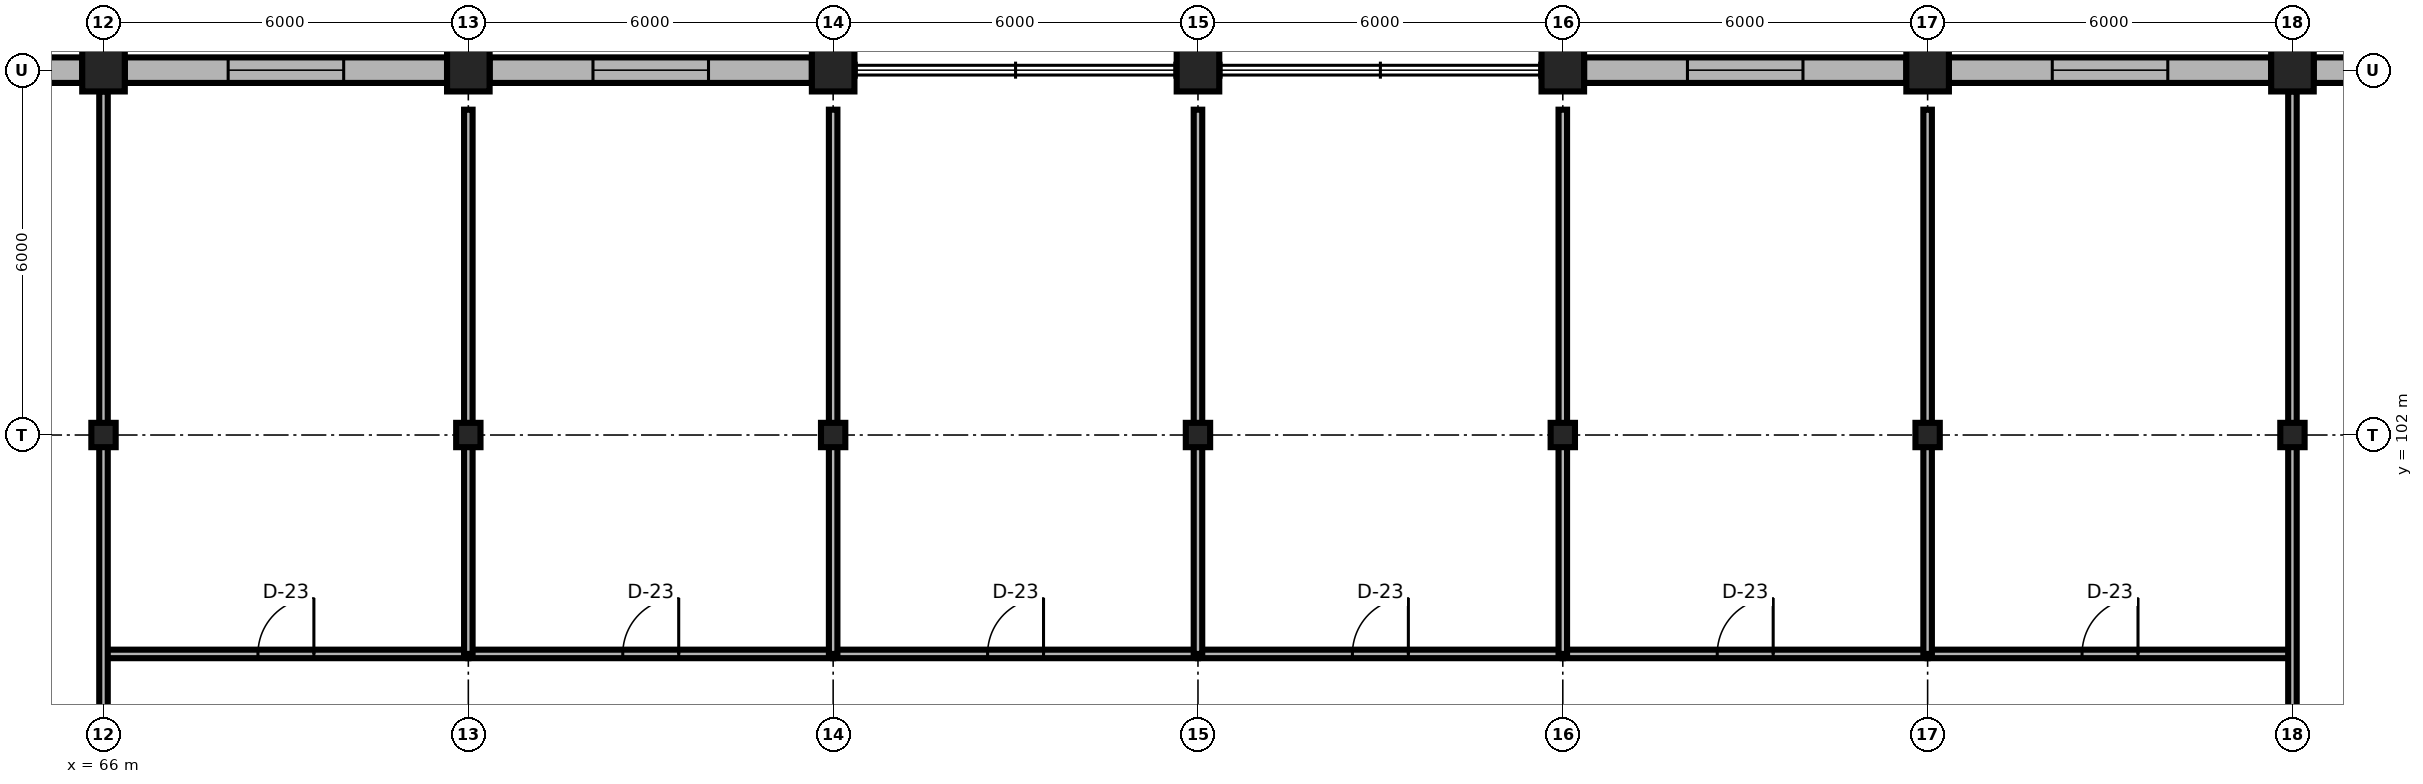
"""IFC4 building model, lengths in metres.
Left out: names, types, materials, properties, quantities, classifications, styles, units other than length and angle.
Written with IfcOpenShell. Run it as: python <this file> out.ifc"""

import sys

from ifc_helpers import new_model, si_unit, direction, frame, frame_2d, origin, origin_2d, place, context, subcontext, project, spatial, rectangle, i_section, extrude, element, fill, save


model = new_model("IFC4")
c1 = context("Model", 3, precision=1e-05, world=origin(), true_north=direction((0.0, 1.0)))
c2 = subcontext(c1, "Body", "Model", "MODEL_VIEW")
j1 = project(units=[si_unit("LENGTHUNIT", "METRE"), si_unit("PLANEANGLEUNIT", "RADIAN")], contexts=[c1])
p1 = place(None, origin())
s1 = spatial("IfcSite", under=j1, at=p1, CompositionType="ELEMENT")
p2 = place(p1, origin())
s2 = spatial("IfcBuilding", under=s1, at=p2, CompositionType="ELEMENT")
p3 = place(p2, frame((0.0, 0.0, 24.9)))
s3 = spatial("IfcBuildingStorey", under=s2, at=p3, CompositionType="ELEMENT", Elevation=24.9)
for number, where, z_axis, x_axis in (
    (1, (66.0, 102.0, 0.0), (0.0, 0.0, 1.0), (1.0, 0.0, 0.0)),
    (2, (72.0, 102.0, 0.0), (0.0, 0.0, 1.0), (1.0, 0.0, 0.0)),
    (3, (78.0, 102.0, 0.0), (0.0, 0.0, 1.0), (1.0, 0.0, 0.0)),
    (4, (84.0, 102.0, 0.0), (0.0, 0.0, 1.0), (1.0, 0.0, 0.0)),
    (5, (90.0, 102.0, 0.0), (0.0, 0.0, 1.0), (1.0, 0.0, 0.0)),
    (6, (96.0, 102.0, 0.0), (0.0, 0.0, 1.0), (1.0, 0.0, 0.0)),
    (7, (102.0, 102.0, 0.0), (0.0, 0.0, 1.0), (1.0, 0.0, 0.0)),
):
    element("IfcColumn", number, at=place(p3, frame(where, z_axis=z_axis, x_axis=x_axis)), inside=s3, PredefinedType="COLUMN", context=c2, shape_type="SweptSolid", body=[
        extrude(i_section(OverallWidth=0.4, OverallDepth=0.4, WebThickness=0.013, FlangeThickness=0.021, FilletRadius=0.022, at=origin_2d()), origin(), (0.0, 0.0, 1.0), 3.9),
    ])
for number, where, z_axis, x_axis in (
    (8, (66.0, 108.0, 0.0), (0.0, 0.0, 1.0), (1.0, 0.0, 0.0)),
    (9, (72.0, 108.0, 0.0), (0.0, 0.0, 1.0), (1.0, 0.0, 0.0)),
    (10, (78.0, 108.0, 0.0), (0.0, 0.0, 1.0), (1.0, 0.0, 0.0)),
    (11, (84.0, 108.0, 0.0), (0.0, 0.0, 1.0), (1.0, 0.0, 0.0)),
    (12, (90.0, 108.0, 0.0), (0.0, 0.0, 1.0), (1.0, 0.0, 0.0)),
    (13, (96.0, 108.0, 0.0), (0.0, 0.0, 1.0), (1.0, 0.0, 0.0)),
    (14, (102.0, 108.0, 0.0), (0.0, 0.0, 1.0), (1.0, 0.0, 0.0)),
):
    element("IfcColumn", number, at=place(p3, frame(where, z_axis=z_axis, x_axis=x_axis)), inside=s3, PredefinedType="COLUMN", context=c2, shape_type="SweptSolid", body=[
        extrude(rectangle(XDim=0.7, YDim=0.7, at=origin_2d()), origin(), (0.0, 0.0, 1.0), 3.9),
    ])
p4 = place(p3, frame((60.35, 108.0, 0.0), z_axis=(0.0, 0.0, 1.0), x_axis=(1.0, 0.0, 0.0)))
e15 = element("IfcWall", 15, at=p4, inside=s3, PredefinedType="SOLIDWALL", context=c2, shape_type="SweptSolid", body=[
    extrude(rectangle(XDim=5.3, YDim=0.42, at=frame_2d((2.65, 0.0))), origin(), (0.0, 0.0, 1.0), 3.32),
])
p5 = place(p4, frame((1.7, 0.0, 0.85)))
e16 = element("IfcOpeningElement", 16, at=p5, cuts=e15, PredefinedType="OPENING", context=c2, shape_type="SweptSolid", body=[
    extrude(rectangle(XDim=1.9, YDim=2.1, at=frame_2d((0.95, 1.05))), frame((0.0, 0.225, 0.0), z_axis=(0.0, -1.0, 0.0), x_axis=(1.0, 0.0, 0.0)), (0.0, 0.0, 1.0), 0.45),
])
p6 = place(p3, frame((66.35, 108.0, 0.0), z_axis=(0.0, 0.0, 1.0), x_axis=(1.0, 0.0, 0.0)))
e17 = element("IfcWall", 17, at=p6, inside=s3, PredefinedType="SOLIDWALL", context=c2, shape_type="SweptSolid", body=[
    extrude(rectangle(XDim=5.3, YDim=0.42, at=frame_2d((2.65, 0.0))), origin(), (0.0, 0.0, 1.0), 3.32),
])
p7 = place(p6, frame((1.7, 0.0, 0.85)))
e18 = element("IfcOpeningElement", 18, at=p7, cuts=e17, PredefinedType="OPENING", context=c2, shape_type="SweptSolid", body=[
    extrude(rectangle(XDim=1.9, YDim=2.1, at=frame_2d((0.95, 1.05))), frame((0.0, 0.225, 0.0), z_axis=(0.0, -1.0, 0.0), x_axis=(1.0, 0.0, 0.0)), (0.0, 0.0, 1.0), 0.45),
])
p8 = place(p3, frame((72.35, 108.0, 0.0), z_axis=(0.0, 0.0, 1.0), x_axis=(1.0, 0.0, 0.0)))
e19 = element("IfcWall", 19, at=p8, inside=s3, PredefinedType="SOLIDWALL", context=c2, shape_type="SweptSolid", body=[
    extrude(rectangle(XDim=5.3, YDim=0.42, at=frame_2d((2.65, 0.0))), origin(), (0.0, 0.0, 1.0), 3.32),
])
p9 = place(p8, frame((1.7, 0.0, 0.85)))
e20 = element("IfcOpeningElement", 20, at=p9, cuts=e19, PredefinedType="OPENING", context=c2, shape_type="SweptSolid", body=[
    extrude(rectangle(XDim=1.9, YDim=2.1, at=frame_2d((0.95, 1.05))), frame((0.0, 0.225, 0.0), z_axis=(0.0, -1.0, 0.0), x_axis=(1.0, 0.0, 0.0)), (0.0, 0.0, 1.0), 0.45),
])
p10 = place(p3, frame((90.35, 108.0, 0.0), z_axis=(0.0, 0.0, 1.0), x_axis=(1.0, 0.0, 0.0)))
e21 = element("IfcWall", 21, at=p10, inside=s3, PredefinedType="SOLIDWALL", context=c2, shape_type="SweptSolid", body=[
    extrude(rectangle(XDim=5.3, YDim=0.42, at=frame_2d((2.65, 0.0))), origin(), (0.0, 0.0, 1.0), 3.32),
])
p11 = place(p10, frame((1.7, 0.0, 0.85)))
e22 = element("IfcOpeningElement", 22, at=p11, cuts=e21, PredefinedType="OPENING", context=c2, shape_type="SweptSolid", body=[
    extrude(rectangle(XDim=1.9, YDim=2.1, at=frame_2d((0.95, 1.05))), frame((0.0, 0.225, 0.0), z_axis=(0.0, -1.0, 0.0), x_axis=(1.0, 0.0, 0.0)), (0.0, 0.0, 1.0), 0.45),
])
p12 = place(p3, frame((96.35, 108.0, 0.0), z_axis=(0.0, 0.0, 1.0), x_axis=(1.0, 0.0, 0.0)))
e23 = element("IfcWall", 23, at=p12, inside=s3, PredefinedType="SOLIDWALL", context=c2, shape_type="SweptSolid", body=[
    extrude(rectangle(XDim=5.3, YDim=0.42, at=frame_2d((2.65, 0.0))), origin(), (0.0, 0.0, 1.0), 3.32),
])
p13 = place(p12, frame((1.7, 0.0, 0.85)))
e24 = element("IfcOpeningElement", 24, at=p13, cuts=e23, PredefinedType="OPENING", context=c2, shape_type="SweptSolid", body=[
    extrude(rectangle(XDim=1.9, YDim=2.1, at=frame_2d((0.95, 1.05))), frame((0.0, 0.225, 0.0), z_axis=(0.0, -1.0, 0.0), x_axis=(1.0, 0.0, 0.0)), (0.0, 0.0, 1.0), 0.45),
])
p14 = place(p3, frame((102.35, 108.0, 0.0), z_axis=(0.0, 0.0, 1.0), x_axis=(1.0, 0.0, 0.0)))
e25 = element("IfcWall", 25, at=p14, inside=s3, PredefinedType="SOLIDWALL", context=c2, shape_type="SweptSolid", body=[
    extrude(rectangle(XDim=5.3, YDim=0.42, at=frame_2d((2.65, 0.0))), origin(), (0.0, 0.0, 1.0), 3.32),
])
p15 = place(p14, frame((1.7, 0.0, 0.85)))
e26 = element("IfcOpeningElement", 26, at=p15, cuts=e25, PredefinedType="OPENING", context=c2, shape_type="SweptSolid", body=[
    extrude(rectangle(XDim=1.9, YDim=2.1, at=frame_2d((0.95, 1.05))), frame((0.0, 0.225, 0.0), z_axis=(0.0, -1.0, 0.0), x_axis=(1.0, 0.0, 0.0)), (0.0, 0.0, 1.0), 0.45),
])
p16 = place(p3, frame((66.0, 98.4, 0.0), z_axis=(0.0, 0.0, 1.0), x_axis=(1.0, 0.0, 0.0)))
e27 = element("IfcWall", 27, at=p16, inside=s3, PredefinedType="PARTITIONING", context=c2, shape_type="SweptSolid", body=[
    extrude(rectangle(XDim=6.0, YDim=0.14, at=frame_2d((3.0, 0.0))), origin(), (0.0, 0.0, 1.0), 3.74),
])
p17 = place(p16, frame((2.54, 0.0, 0.0)))
e28 = element("IfcOpeningElement", 28, at=p17, cuts=e27, PredefinedType="OPENING", context=c2, shape_type="SweptSolid", body=[
    extrude(rectangle(XDim=0.92, YDim=2.15, at=frame_2d((0.46, 1.075))), frame((0.0, 0.085, 0.0), z_axis=(0.0, -1.0, 0.0), x_axis=(1.0, 0.0, 0.0)), (0.0, 0.0, 1.0), 0.17),
])
p18 = place(p3, frame((72.0, 98.4, 0.0), z_axis=(0.0, 0.0, 1.0), x_axis=(1.0, 0.0, 0.0)))
e29 = element("IfcWall", 29, at=p18, inside=s3, PredefinedType="PARTITIONING", context=c2, shape_type="SweptSolid", body=[
    extrude(rectangle(XDim=6.0, YDim=0.14, at=frame_2d((3.0, 0.0))), origin(), (0.0, 0.0, 1.0), 3.74),
])
p19 = place(p18, frame((2.54, 0.0, 0.0)))
e30 = element("IfcOpeningElement", 30, at=p19, cuts=e29, PredefinedType="OPENING", context=c2, shape_type="SweptSolid", body=[
    extrude(rectangle(XDim=0.92, YDim=2.15, at=frame_2d((0.46, 1.075))), frame((0.0, 0.085, 0.0), z_axis=(0.0, -1.0, 0.0), x_axis=(1.0, 0.0, 0.0)), (0.0, 0.0, 1.0), 0.17),
])
p20 = place(p3, frame((78.0, 98.4, 0.0), z_axis=(0.0, 0.0, 1.0), x_axis=(1.0, 0.0, 0.0)))
e31 = element("IfcWall", 31, at=p20, inside=s3, PredefinedType="PARTITIONING", context=c2, shape_type="SweptSolid", body=[
    extrude(rectangle(XDim=6.0, YDim=0.14, at=frame_2d((3.0, 0.0))), origin(), (0.0, 0.0, 1.0), 3.74),
])
p21 = place(p20, frame((2.54, 0.0, 0.0)))
e32 = element("IfcOpeningElement", 32, at=p21, cuts=e31, PredefinedType="OPENING", context=c2, shape_type="SweptSolid", body=[
    extrude(rectangle(XDim=0.92, YDim=2.15, at=frame_2d((0.46, 1.075))), frame((0.0, 0.085, 0.0), z_axis=(0.0, -1.0, 0.0), x_axis=(1.0, 0.0, 0.0)), (0.0, 0.0, 1.0), 0.17),
])
p22 = place(p3, frame((84.0, 98.4, 0.0), z_axis=(0.0, 0.0, 1.0), x_axis=(1.0, 0.0, 0.0)))
e33 = element("IfcWall", 33, at=p22, inside=s3, PredefinedType="PARTITIONING", context=c2, shape_type="SweptSolid", body=[
    extrude(rectangle(XDim=6.0, YDim=0.14, at=frame_2d((3.0, 0.0))), origin(), (0.0, 0.0, 1.0), 3.74),
])
p23 = place(p22, frame((2.54, 0.0, 0.0)))
e34 = element("IfcOpeningElement", 34, at=p23, cuts=e33, PredefinedType="OPENING", context=c2, shape_type="SweptSolid", body=[
    extrude(rectangle(XDim=0.92, YDim=2.15, at=frame_2d((0.46, 1.075))), frame((0.0, 0.085, 0.0), z_axis=(0.0, -1.0, 0.0), x_axis=(1.0, 0.0, 0.0)), (0.0, 0.0, 1.0), 0.17),
])
p24 = place(p3, frame((90.0, 98.4, 0.0), z_axis=(0.0, 0.0, 1.0), x_axis=(1.0, 0.0, 0.0)))
e35 = element("IfcWall", 35, at=p24, inside=s3, PredefinedType="PARTITIONING", context=c2, shape_type="SweptSolid", body=[
    extrude(rectangle(XDim=6.0, YDim=0.14, at=frame_2d((3.0, 0.0))), origin(), (0.0, 0.0, 1.0), 3.74),
])
p25 = place(p24, frame((2.54, 0.0, 0.0)))
e36 = element("IfcOpeningElement", 36, at=p25, cuts=e35, PredefinedType="OPENING", context=c2, shape_type="SweptSolid", body=[
    extrude(rectangle(XDim=0.92, YDim=2.15, at=frame_2d((0.46, 1.075))), frame((0.0, 0.085, 0.0), z_axis=(0.0, -1.0, 0.0), x_axis=(1.0, 0.0, 0.0)), (0.0, 0.0, 1.0), 0.17),
])
p26 = place(p3, frame((96.0, 98.4, 0.0), z_axis=(0.0, 0.0, 1.0), x_axis=(1.0, 0.0, 0.0)))
e37 = element("IfcWall", 37, at=p26, inside=s3, PredefinedType="PARTITIONING", context=c2, shape_type="SweptSolid", body=[
    extrude(rectangle(XDim=6.0, YDim=0.14, at=frame_2d((3.0, 0.0))), origin(), (0.0, 0.0, 1.0), 3.74),
])
p27 = place(p26, frame((2.54, 0.0, 0.0)))
e38 = element("IfcOpeningElement", 38, at=p27, cuts=e37, PredefinedType="OPENING", context=c2, shape_type="SweptSolid", body=[
    extrude(rectangle(XDim=0.92, YDim=2.15, at=frame_2d((0.46, 1.075))), frame((0.0, 0.085, 0.0), z_axis=(0.0, -1.0, 0.0), x_axis=(1.0, 0.0, 0.0)), (0.0, 0.0, 1.0), 0.17),
])
for number, where, z_axis, x_axis in (
    (39, (72.0, 98.4, 0.0), (0.0, 0.0, 1.0), (0.0, 1.0, 0.0)),
    (40, (78.0, 98.4, 0.0), (0.0, 0.0, 1.0), (0.0, 1.0, 0.0)),
    (41, (84.0, 98.4, 0.0), (0.0, 0.0, 1.0), (0.0, 1.0, 0.0)),
    (42, (90.0, 98.4, 0.0), (0.0, 0.0, 1.0), (0.0, 1.0, 0.0)),
    (43, (96.0, 98.4, 0.0), (0.0, 0.0, 1.0), (0.0, 1.0, 0.0)),
):
    element("IfcWall", number, at=place(p3, frame(where, z_axis=z_axis, x_axis=x_axis)), inside=s3, PredefinedType="PARTITIONING", context=c2, shape_type="SweptSolid", body=[
        extrude(rectangle(XDim=8.95, YDim=0.14, at=frame_2d((4.475, 0.0))), origin(), (0.0, 0.0, 1.0), 3.352),
    ])
for number, where, z_axis, x_axis in (
    (44, (66.0, 96.35, 0.0), (0.0, 0.0, 1.0), (0.0, 1.0, 0.0)),
    (45, (102.0, 96.35, 0.0), (0.0, 0.0, 1.0), (0.0, 1.0, 0.0)),
):
    element("IfcWall", number, at=place(p3, frame(where, z_axis=z_axis, x_axis=x_axis)), inside=s3, PredefinedType="PARTITIONING", context=c2, shape_type="SweptSolid", body=[
        extrude(rectangle(XDim=11.3, YDim=0.14, at=frame_2d((5.65, 0.0))), origin(), (0.0, 0.0, 1.0), 3.352),
    ])
p28 = place(p7, origin())
e46 = element("IfcWindow", 46, at=p28, inside=s3, PartitioningType="SINGLE_PANEL", PredefinedType="WINDOW", context=c2, shape_type="SweptSolid", body=[
    extrude(rectangle(XDim=1.9, YDim=2.1, at=frame_2d((0.95, 1.05))), frame((0.0, 0.03, 0.0), z_axis=(0.0, -1.0, 0.0), x_axis=(1.0, 0.0, 0.0)), (0.0, 0.0, 1.0), 0.06),
])
fill(e18, e46)
p29 = place(p9, origin())
e47 = element("IfcWindow", 47, at=p29, inside=s3, PartitioningType="SINGLE_PANEL", PredefinedType="WINDOW", context=c2, shape_type="SweptSolid", body=[
    extrude(rectangle(XDim=1.9, YDim=2.1, at=frame_2d((0.95, 1.05))), frame((0.0, 0.03, 0.0), z_axis=(0.0, -1.0, 0.0), x_axis=(1.0, 0.0, 0.0)), (0.0, 0.0, 1.0), 0.06),
])
fill(e20, e47)
p30 = place(p11, origin())
e48 = element("IfcWindow", 48, at=p30, inside=s3, PartitioningType="SINGLE_PANEL", PredefinedType="WINDOW", context=c2, shape_type="SweptSolid", body=[
    extrude(rectangle(XDim=1.9, YDim=2.1, at=frame_2d((0.95, 1.05))), frame((0.0, 0.03, 0.0), z_axis=(0.0, -1.0, 0.0), x_axis=(1.0, 0.0, 0.0)), (0.0, 0.0, 1.0), 0.06),
])
fill(e22, e48)
p31 = place(p13, origin())
e49 = element("IfcWindow", 49, at=p31, inside=s3, PartitioningType="SINGLE_PANEL", PredefinedType="WINDOW", context=c2, shape_type="SweptSolid", body=[
    extrude(rectangle(XDim=1.9, YDim=2.1, at=frame_2d((0.95, 1.05))), frame((0.0, 0.03, 0.0), z_axis=(0.0, -1.0, 0.0), x_axis=(1.0, 0.0, 0.0)), (0.0, 0.0, 1.0), 0.06),
])
fill(e24, e49)
p32 = place(p17, origin())
e50 = element("IfcDoor", 50, at=p32, inside=s3, OperationType="SINGLE_SWING_RIGHT", PredefinedType="DOOR", context=c2, shape_type="SweptSolid", body=[
    extrude(rectangle(XDim=0.92, YDim=2.15, at=frame_2d((0.46, 1.075))), frame((0.0, 0.025, 0.0), z_axis=(0.0, -1.0, 0.0), x_axis=(1.0, 0.0, 0.0)), (0.0, 0.0, 1.0), 0.05),
])
fill(e28, e50)
p33 = place(p19, origin())
e51 = element("IfcDoor", 51, at=p33, inside=s3, OperationType="SINGLE_SWING_RIGHT", PredefinedType="DOOR", context=c2, shape_type="SweptSolid", body=[
    extrude(rectangle(XDim=0.92, YDim=2.15, at=frame_2d((0.46, 1.075))), frame((0.0, 0.025, 0.0), z_axis=(0.0, -1.0, 0.0), x_axis=(1.0, 0.0, 0.0)), (0.0, 0.0, 1.0), 0.05),
])
fill(e30, e51)
p34 = place(p21, origin())
e52 = element("IfcDoor", 52, at=p34, inside=s3, OperationType="SINGLE_SWING_RIGHT", PredefinedType="DOOR", context=c2, shape_type="SweptSolid", body=[
    extrude(rectangle(XDim=0.92, YDim=2.15, at=frame_2d((0.46, 1.075))), frame((0.0, 0.025, 0.0), z_axis=(0.0, -1.0, 0.0), x_axis=(1.0, 0.0, 0.0)), (0.0, 0.0, 1.0), 0.05),
])
fill(e32, e52)
p35 = place(p23, origin())
e53 = element("IfcDoor", 53, at=p35, inside=s3, OperationType="SINGLE_SWING_RIGHT", PredefinedType="DOOR", context=c2, shape_type="SweptSolid", body=[
    extrude(rectangle(XDim=0.92, YDim=2.15, at=frame_2d((0.46, 1.075))), frame((0.0, 0.025, 0.0), z_axis=(0.0, -1.0, 0.0), x_axis=(1.0, 0.0, 0.0)), (0.0, 0.0, 1.0), 0.05),
])
fill(e34, e53)
p36 = place(p25, origin())
e54 = element("IfcDoor", 54, at=p36, inside=s3, OperationType="SINGLE_SWING_RIGHT", PredefinedType="DOOR", context=c2, shape_type="SweptSolid", body=[
    extrude(rectangle(XDim=0.92, YDim=2.15, at=frame_2d((0.46, 1.075))), frame((0.0, 0.025, 0.0), z_axis=(0.0, -1.0, 0.0), x_axis=(1.0, 0.0, 0.0)), (0.0, 0.0, 1.0), 0.05),
])
fill(e36, e54)
p37 = place(p27, origin())
e55 = element("IfcDoor", 55, at=p37, inside=s3, OperationType="SINGLE_SWING_RIGHT", PredefinedType="DOOR", context=c2, shape_type="SweptSolid", body=[
    extrude(rectangle(XDim=0.92, YDim=2.15, at=frame_2d((0.46, 1.075))), frame((0.0, 0.025, 0.0), z_axis=(0.0, -1.0, 0.0), x_axis=(1.0, 0.0, 0.0)), (0.0, 0.0, 1.0), 0.05),
])
fill(e38, e55)
save(model, sys.argv[1])
